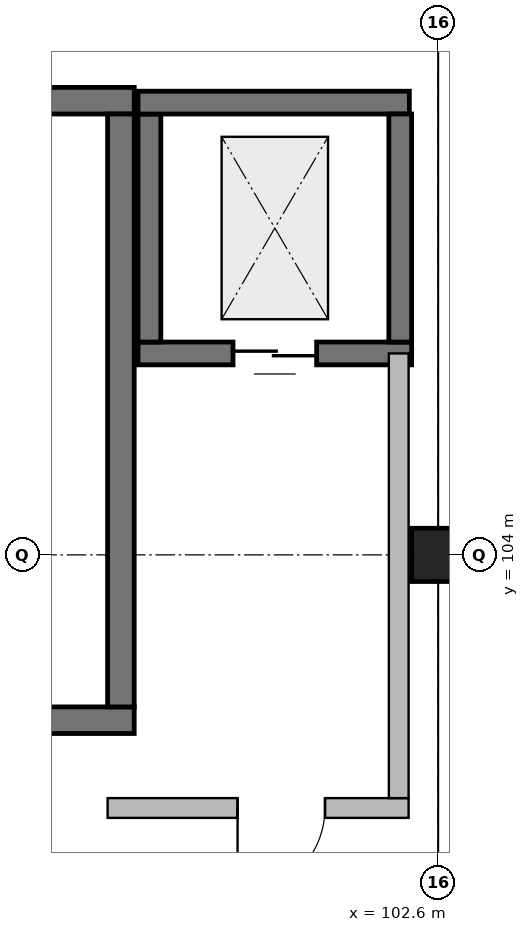
"""IFC4 building model, lengths in metres.
Left out: names, types, materials, properties, quantities, classifications, styles, units other than length and angle.
Written with IfcOpenShell. Run it as: python <this file> out.ifc"""

import sys

from ifc_helpers import new_model, si_unit, direction, frame, frame_2d, origin, origin_2d, place, context, subcontext, project, spatial, rectangle, extrude, element, fill, save


model = new_model("IFC4")
c1 = context("Model", 3, precision=1e-05, world=origin(), true_north=direction((0.0, 1.0)))
c2 = subcontext(c1, "Body", "Model", "MODEL_VIEW")
j1 = project(units=[si_unit("LENGTHUNIT", "METRE"), si_unit("PLANEANGLEUNIT", "RADIAN")], contexts=[c1])
p1 = place(None, origin())
s1 = spatial("IfcSite", under=j1, at=p1, CompositionType="ELEMENT")
p2 = place(p1, origin())
s2 = spatial("IfcBuilding", under=s1, at=p2, CompositionType="ELEMENT")
p3 = place(p2, frame((0.0, 0.0, -4.8)))
s3 = spatial("IfcBuildingStorey", under=s2, at=p3, CompositionType="ELEMENT", Elevation=-4.8)
p4 = place(p3, frame((102.6, 104.0, 0.0), z_axis=(0.0, 0.0, 1.0), x_axis=(1.0, 0.0, 0.0)))
e1 = element("IfcColumn", 1, at=p4, inside=s3, PredefinedType="COLUMN", context=c2, shape_type="SweptSolid", body=[
    extrude(rectangle(XDim=0.7, YDim=0.7, at=origin_2d()), origin(), (0.0, 0.0, 1.0), 4.8),
])
for number, where, z_axis, x_axis in (
    (2, (98.6, 101.825, 0.0), (0.0, 0.0, 1.0), (-1.0, 0.0, 0.0)),
    (3, (94.45, 109.975, 0.0), (0.0, 0.0, 1.0), (1.0, 0.0, 0.0)),
):
    element("IfcWall", number, at=place(p3, frame(where, z_axis=z_axis, x_axis=x_axis)), inside=s3, PredefinedType="SOLIDWALL", context=c2, shape_type="SweptSolid", body=[
        extrude(rectangle(XDim=4.15, YDim=0.35, at=frame_2d((2.075, 0.0))), origin(), (0.0, 0.0, 1.0), 4.48),
    ])
p5 = place(p3, frame((98.425, 109.8, 0.0), z_axis=(0.0, 0.0, 1.0), x_axis=(0.0, -1.0, 0.0)))
e4 = element("IfcWall", 4, at=p5, inside=s3, PredefinedType="SOLIDWALL", context=c2, shape_type="SweptSolid", body=[
    extrude(rectangle(XDim=7.8, YDim=0.35, at=frame_2d((3.9, 0.0))), origin(), (0.0, 0.0, 1.0), 4.48),
])
p6 = place(p3, frame((102.25, 106.65, 0.0), z_axis=(0.0, 0.0, 1.0), x_axis=(-1.0, 0.0, 0.0)))
e5 = element("IfcWall", 5, at=p6, inside=s3, PredefinedType="SOLIDWALL", context=c2, shape_type="SweptSolid", body=[
    extrude(rectangle(XDim=3.6, YDim=0.3, at=frame_2d((1.8, 0.0))), origin(), (0.0, 0.0, 1.0), 4.8),
])
p7 = place(p6, frame((1.25, 0.0, 0.0)))
e6 = element("IfcOpeningElement", 6, at=p7, cuts=e5, PredefinedType="OPENING", context=c2, shape_type="SweptSolid", body=[
    extrude(rectangle(XDim=1.1, YDim=2.1, at=frame_2d((0.55, 1.05))), frame((0.0, 0.17, 0.0), z_axis=(0.0, -1.0, 0.0), x_axis=(1.0, 0.0, 0.0)), (0.0, 0.0, 1.0), 0.34),
])
p8 = place(p3, frame((98.8, 106.8, 0.0), z_axis=(0.0, 0.0, 1.0), x_axis=(0.0, 1.0, 0.0)))
e7 = element("IfcWall", 7, at=p8, inside=s3, PredefinedType="SOLIDWALL", context=c2, shape_type="SweptSolid", body=[
    extrude(rectangle(XDim=3.0, YDim=0.3, at=frame_2d((1.5, 0.0))), origin(), (0.0, 0.0, 1.0), 4.8),
])
p9 = place(p3, frame((98.65, 109.95, 0.0), z_axis=(0.0, 0.0, 1.0), x_axis=(1.0, 0.0, 0.0)))
e8 = element("IfcWall", 8, at=p9, inside=s3, PredefinedType="SOLIDWALL", context=c2, shape_type="SweptSolid", body=[
    extrude(rectangle(XDim=3.57, YDim=0.3, at=frame_2d((1.785, 0.0))), origin(), (0.0, 0.0, 1.0), 4.8),
])
p10 = place(p3, frame((102.1, 109.8, 0.0), z_axis=(0.0, 0.0, 1.0), x_axis=(0.0, -1.0, 0.0)))
e9 = element("IfcWall", 9, at=p10, inside=s3, PredefinedType="SOLIDWALL", context=c2, shape_type="SweptSolid", body=[
    extrude(rectangle(XDim=3.0, YDim=0.3, at=frame_2d((1.5, 0.0))), origin(), (0.0, 0.0, 1.0), 4.8),
])
p11 = place(p3, frame((102.21, 100.67, 0.0), z_axis=(0.0, 0.0, 1.0), x_axis=(-1.0, 0.0, 0.0)))
e10 = element("IfcWall", 10, at=p11, inside=s3, PredefinedType="SOLIDWALL", context=c2, shape_type="SweptSolid", body=[
    extrude(rectangle(XDim=3.96, YDim=0.26, at=frame_2d((1.98, 0.0))), origin(), (0.0, 0.0, 1.0), 4.48),
])
p12 = place(p11, frame((1.1, 0.0, 0.0)))
e11 = element("IfcOpeningElement", 11, at=p12, cuts=e10, PredefinedType="OPENING", context=c2, shape_type="SweptSolid", body=[
    extrude(rectangle(XDim=1.15, YDim=2.2, at=frame_2d((0.575, 1.1))), frame((0.0, 0.15, 0.0), z_axis=(0.0, -1.0, 0.0), x_axis=(1.0, 0.0, 0.0)), (0.0, 0.0, 1.0), 0.3),
])
p13 = place(p3, frame((102.08, 106.65, 0.0), z_axis=(0.0, 0.0, 1.0), x_axis=(0.0, -1.0, 0.0)))
e12 = element("IfcWall", 12, at=p13, inside=s3, PredefinedType="SOLIDWALL", context=c2, shape_type="SweptSolid", body=[
    extrude(rectangle(XDim=5.85, YDim=0.26, at=frame_2d((2.925, 0.0))), origin(), (0.0, 0.0, 1.0), 4.48),
])
p14 = place(p7, origin())
e13 = element("IfcDoor", 13, at=p14, inside=s3, OperationType="DOUBLE_DOOR_SLIDING", PredefinedType="DOOR", context=c2, shape_type="SweptSolid", body=[
    extrude(rectangle(XDim=1.1, YDim=2.1, at=frame_2d((0.55, 1.05))), frame((0.0, 0.025, 0.0), z_axis=(0.0, -1.0, 0.0), x_axis=(1.0, 0.0, 0.0)), (0.0, 0.0, 1.0), 0.05),
])
fill(e6, e13)
p15 = place(p12, origin())
e14 = element("IfcDoor", 14, at=p15, inside=s3, OperationType="SINGLE_SWING_RIGHT", PredefinedType="DOOR", context=c2, shape_type="SweptSolid", body=[
    extrude(rectangle(XDim=1.15, YDim=2.2, at=frame_2d((0.575, 1.1))), frame((0.0, 0.025, 0.0), z_axis=(0.0, -1.0, 0.0), x_axis=(1.0, 0.0, 0.0)), (0.0, 0.0, 1.0), 0.05),
])
fill(e11, e14)
save(model, sys.argv[1])
